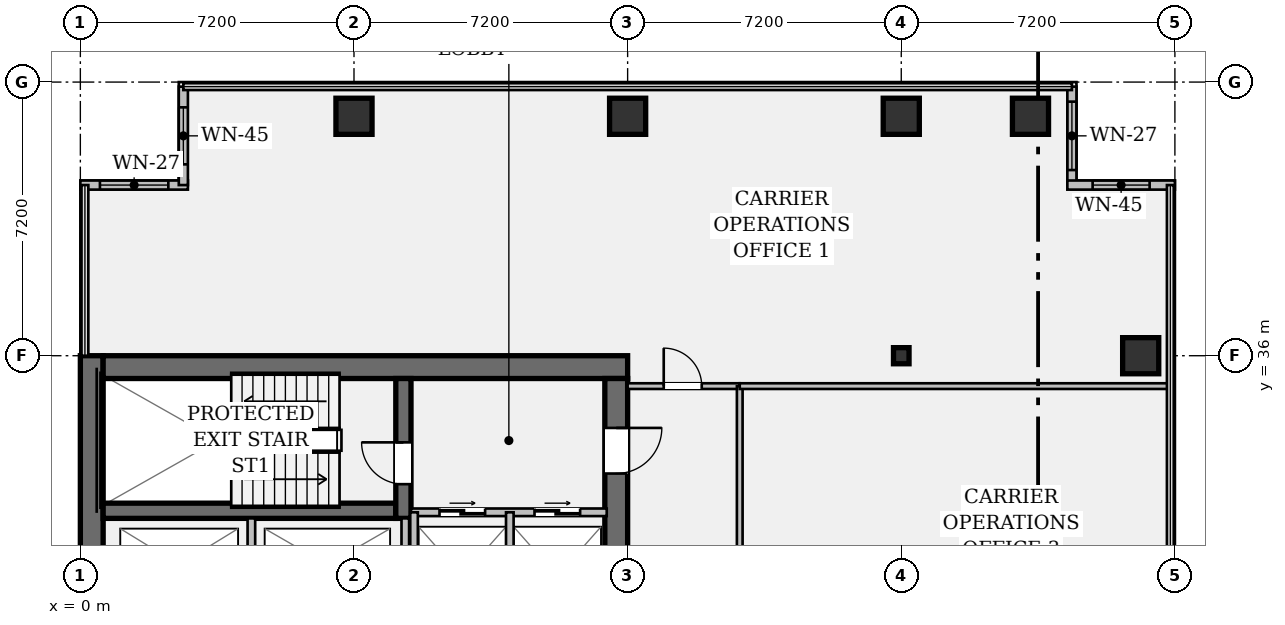
"""IFC4 building model, lengths in metres.
Left out: names, types, materials, properties, quantities, classifications, styles, units other than length and angle.
Written with IfcOpenShell. Run it as: python <this file> out.ifc"""

import sys

from ifc_helpers import new_model, si_unit, direction, frame, frame_2d, origin, origin_2d, place, context, subcontext, project, spatial, rectangle, hollow_rectangle, i_section, extrude, element, fill, save


model = new_model("IFC4")
c1 = context("Model", 3, precision=1e-05, world=origin(), true_north=direction((0.0, 1.0)))
c2 = subcontext(c1, "Body", "Model", "MODEL_VIEW")
j1 = project(units=[si_unit("LENGTHUNIT", "METRE"), si_unit("PLANEANGLEUNIT", "RADIAN")], contexts=[c1])
p1 = place(None, origin())
s1 = spatial("IfcSite", under=j1, at=p1, CompositionType="ELEMENT")
p2 = place(p1, origin())
s2 = spatial("IfcBuilding", under=s1, at=p2, CompositionType="ELEMENT")
p3 = place(p2, frame((0.0, 0.0, 88.9)))
s3 = spatial("IfcBuildingStorey", under=s2, at=p3, CompositionType="ELEMENT", Elevation=88.9)
p4 = place(p3, frame((0.3, 7.2, 0.0), z_axis=(0.0, 0.0, 1.0), x_axis=(0.0, 1.0, 0.0)))
e1 = element("IfcWall", 1, at=p4, inside=s3, PredefinedType="SHEAR", context=c2, shape_type="SweptSolid", body=[
    extrude(rectangle(XDim=28.8, YDim=0.6, at=frame_2d((14.4, 0.0))), origin(), (0.0, 0.0, 1.0), 3.57),
])
p5 = place(p3, frame((0.6, 35.7, 0.0), z_axis=(0.0, 0.0, 1.0), x_axis=(1.0, 0.0, 0.0)))
e2 = element("IfcWall", 2, at=p5, inside=s3, PredefinedType="SHEAR", context=c2, shape_type="SweptSolid", body=[
    extrude(rectangle(XDim=13.8, YDim=0.6, at=frame_2d((6.9, 0.0))), origin(), (0.0, 0.0, 1.0), 3.57),
])
p6 = place(p3, frame((14.1, 35.4, 0.0), z_axis=(0.0, 0.0, 1.0), x_axis=(0.0, -1.0, 0.0)))
e3 = element("IfcWall", 3, at=p6, inside=s3, PredefinedType="SHEAR", context=c2, shape_type="SweptSolid", body=[
    extrude(rectangle(XDim=27.6, YDim=0.6, at=frame_2d((13.8, 0.0))), origin(), (0.0, 0.0, 1.0), 3.57),
])
p7 = place(p6, frame((1.3, 0.0, 0.0)))
e4 = element("IfcOpeningElement", 4, at=p7, cuts=e3, PredefinedType="OPENING", context=c2, shape_type="SweptSolid", body=[
    extrude(rectangle(XDim=1.2, YDim=2.15, at=frame_2d((0.6, 1.075))), frame((0.0, 0.312, 0.0), z_axis=(0.0, -1.0, 0.0), x_axis=(1.0, 0.0, 0.0)), (0.0, 0.0, 1.0), 0.624),
])
p8 = place(p6, frame((25.25, 0.0, 0.0)))
e5 = element("IfcOpeningElement", 5, at=p8, cuts=e3, PredefinedType="OPENING", context=c2, shape_type="SweptSolid", body=[
    extrude(rectangle(XDim=1.2, YDim=2.15, at=frame_2d((0.6, 1.075))), frame((0.0, 0.312, 0.0), z_axis=(0.0, -1.0, 0.0), x_axis=(1.0, 0.0, 0.0)), (0.0, 0.0, 1.0), 0.624),
])
p9 = place(p6, frame((14.6, 0.0, 0.0)))
e6 = element("IfcOpeningElement", 6, at=p9, cuts=e3, PredefinedType="OPENING", context=c2, shape_type="SweptSolid", body=[
    extrude(rectangle(XDim=1.6, YDim=2.2, at=frame_2d((0.8, 1.1))), frame((0.0, 0.312, 0.0), z_axis=(0.0, -1.0, 0.0), x_axis=(1.0, 0.0, 0.0)), (0.0, 0.0, 1.0), 0.624),
])
p10 = place(p3, frame((0.6, 31.92, 0.0), z_axis=(0.0, 0.0, 1.0), x_axis=(1.0, 0.0, 0.0)))
e7 = element("IfcWall", 7, at=p10, inside=s3, PredefinedType="SHEAR", context=c2, shape_type="SweptSolid", body=[
    extrude(rectangle(XDim=7.7, YDim=0.4, at=frame_2d((3.85, 0.0))), origin(), (0.0, 0.0, 1.0), 3.57),
])
p11 = place(p3, frame((8.5, 31.72, 0.0), z_axis=(0.0, 0.0, 1.0), x_axis=(0.0, 1.0, 0.0)))
e8 = element("IfcWall", 8, at=p11, inside=s3, PredefinedType="SHEAR", context=c2, shape_type="SweptSolid", body=[
    extrude(rectangle(XDim=3.68, YDim=0.4, at=frame_2d((1.84, 0.0))), origin(), (0.0, 0.0, 1.0), 3.57),
])
p12 = place(p11, frame((0.9, 0.0, 0.0)))
e9 = element("IfcOpeningElement", 9, at=p12, cuts=e8, PredefinedType="OPENING", context=c2, shape_type="SweptSolid", body=[
    extrude(rectangle(XDim=1.1, YDim=2.15, at=frame_2d((0.55, 1.075))), frame((0.0, 0.212, 0.0), z_axis=(0.0, -1.0, 0.0), x_axis=(1.0, 0.0, 0.0)), (0.0, 0.0, 1.0), 0.424),
])
for number, where, z_axis, x_axis in (
    (10, (7.2, 42.3, 0.0), (0.0, 0.0, 1.0), (1.0, 0.0, 0.0)),
    (11, (14.4, 42.3, 0.0), (0.0, 0.0, 1.0), (1.0, 0.0, 0.0)),
):
    element("IfcColumn", number, at=place(p3, frame(where, z_axis=z_axis, x_axis=x_axis)), inside=s3, PredefinedType="COLUMN", context=c2, shape_type="SweptSolid", body=[
        extrude(hollow_rectangle(XDim=0.95, YDim=0.95, WallThickness=0.06, at=origin_2d()), origin(), (0.0, 0.0, 1.0), 3.57),
    ])
p13 = place(p3, frame((21.6, 36.0, 0.0), z_axis=(0.0, 0.0, 1.0), x_axis=(1.0, 0.0, 0.0)))
e12 = element("IfcColumn", 12, at=p13, inside=s3, PredefinedType="COLUMN", context=c2, shape_type="SweptSolid", body=[
    extrude(i_section(OverallWidth=0.409, OverallDepth=0.424, WebThickness=0.033, FlangeThickness=0.052, FilletRadius=0.018, at=origin_2d()), origin(), (0.0, 0.0, 1.0), 3.57),
])
p14 = place(p3, frame((21.6, 42.3, 0.0), z_axis=(0.0, 0.0, 1.0), x_axis=(1.0, 0.0, 0.0)))
e13 = element("IfcColumn", 13, at=p14, inside=s3, PredefinedType="COLUMN", context=c2, shape_type="SweptSolid", body=[
    extrude(hollow_rectangle(XDim=0.95, YDim=0.95, WallThickness=0.06, at=origin_2d()), origin(), (0.0, 0.0, 1.0), 3.57),
])
for number, where, z_axis, x_axis in (
    (14, (25.0, 42.3, 0.0), (0.0, 0.0, 1.0), (1.0, 0.0, 0.0)),
    (15, (27.9, 36.0, 0.0), (0.0, 0.0, 1.0), (1.0, 0.0, 0.0)),
):
    element("IfcColumn", number, at=place(p3, frame(where, z_axis=z_axis, x_axis=x_axis)), inside=s3, PredefinedType="COLUMN", context=c2, shape_type="SweptSolid", body=[
        extrude(hollow_rectangle(XDim=0.95, YDim=0.95, WallThickness=0.06, at=origin_2d()), origin(), (0.0, 0.0, 1.0), 3.85),
    ])
p15 = place(p3, frame((0.0, 40.49, 0.0), z_axis=(0.0, 0.0, 1.0), x_axis=(1.0, 0.0, 0.0)))
e16 = element("IfcWall", 16, at=p15, inside=s3, PredefinedType="STANDARD", context=c2, shape_type="SweptSolid", body=[
    extrude(rectangle(XDim=2.83, YDim=0.24, at=frame_2d((1.415, 0.0))), origin(), (0.0, 0.0, 1.0), 3.57),
])
p16 = place(p15, frame((0.515, 0.0, 0.95)))
e17 = element("IfcOpeningElement", 17, at=p16, cuts=e16, PredefinedType="OPENING", context=c2, shape_type="SweptSolid", body=[
    extrude(rectangle(XDim=1.8, YDim=1.35, at=frame_2d((0.9, 0.675))), frame((0.0, 0.132, 0.0), z_axis=(0.0, -1.0, 0.0), x_axis=(1.0, 0.0, 0.0)), (0.0, 0.0, 1.0), 0.264),
])
p17 = place(p3, frame((2.71, 40.49, 0.0), z_axis=(0.0, 0.0, 1.0), x_axis=(0.0, 1.0, 0.0)))
e18 = element("IfcWall", 18, at=p17, inside=s3, PredefinedType="STANDARD", context=c2, shape_type="SweptSolid", body=[
    extrude(rectangle(XDim=2.59, YDim=0.24, at=frame_2d((1.295, 0.0))), origin(), (0.0, 0.0, 1.0), 3.57),
])
p18 = place(p17, frame((0.545, 0.0, 0.95)))
e19 = element("IfcOpeningElement", 19, at=p18, cuts=e18, PredefinedType="OPENING", context=c2, shape_type="SweptSolid", body=[
    extrude(rectangle(XDim=1.5, YDim=1.8, at=frame_2d((0.75, 0.9))), frame((0.0, 0.132, 0.0), z_axis=(0.0, -1.0, 0.0), x_axis=(1.0, 0.0, 0.0)), (0.0, 0.0, 1.0), 0.264),
])
p19 = place(p3, frame((26.09, 43.08, 0.0), z_axis=(0.0, 0.0, 1.0), x_axis=(0.0, -1.0, 0.0)))
e20 = element("IfcWall", 20, at=p19, inside=s3, PredefinedType="STANDARD", context=c2, shape_type="SweptSolid", body=[
    extrude(rectangle(XDim=2.59, YDim=0.24, at=frame_2d((1.295, 0.0))), origin(), (0.0, 0.0, 1.0), 3.57),
])
p20 = place(p19, frame((0.395, 0.0, 0.95)))
e21 = element("IfcOpeningElement", 21, at=p20, cuts=e20, PredefinedType="OPENING", context=c2, shape_type="SweptSolid", body=[
    extrude(rectangle(XDim=1.8, YDim=1.35, at=frame_2d((0.9, 0.675))), frame((0.0, 0.132, 0.0), z_axis=(0.0, -1.0, 0.0), x_axis=(1.0, 0.0, 0.0)), (0.0, 0.0, 1.0), 0.264),
])
p21 = place(p3, frame((25.97, 40.49, 0.0), z_axis=(0.0, 0.0, 1.0), x_axis=(1.0, 0.0, 0.0)))
e22 = element("IfcWall", 22, at=p21, inside=s3, PredefinedType="STANDARD", context=c2, shape_type="SweptSolid", body=[
    extrude(rectangle(XDim=2.83, YDim=0.24, at=frame_2d((1.415, 0.0))), origin(), (0.0, 0.0, 1.0), 3.57),
])
p22 = place(p21, frame((0.665, 0.0, 0.95)))
e23 = element("IfcOpeningElement", 23, at=p22, cuts=e22, PredefinedType="OPENING", context=c2, shape_type="SweptSolid", body=[
    extrude(rectangle(XDim=1.5, YDim=1.8, at=frame_2d((0.75, 0.9))), frame((0.0, 0.132, 0.0), z_axis=(0.0, -1.0, 0.0), x_axis=(1.0, 0.0, 0.0)), (0.0, 0.0, 1.0), 0.264),
])
p23 = place(p3, frame((8.7, 31.88, 0.0), z_axis=(0.0, 0.0, 1.0), x_axis=(1.0, 0.0, 0.0)))
e24 = element("IfcWall", 24, at=p23, inside=s3, PredefinedType="PARTITIONING", context=c2, shape_type="SweptSolid", body=[
    extrude(rectangle(XDim=5.15, YDim=0.2, at=frame_2d((2.575, 0.0))), origin(), (0.0, 0.0, 1.0), 3.57),
])
p24 = place(p23, frame((0.75, 0.0, 0.0)))
e25 = element("IfcOpeningElement", 25, at=p24, cuts=e24, PredefinedType="OPENING", context=c2, shape_type="SweptSolid", body=[
    extrude(rectangle(XDim=1.2, YDim=2.2, at=frame_2d((0.6, 1.1))), frame((0.0, 0.112, 0.0), z_axis=(0.0, -1.0, 0.0), x_axis=(1.0, 0.0, 0.0)), (0.0, 0.0, 1.0), 0.224),
])
p25 = place(p23, frame((3.25, 0.0, 0.0)))
e26 = element("IfcOpeningElement", 26, at=p25, cuts=e24, PredefinedType="OPENING", context=c2, shape_type="SweptSolid", body=[
    extrude(rectangle(XDim=1.2, YDim=2.2, at=frame_2d((0.6, 1.1))), frame((0.0, 0.112, 0.0), z_axis=(0.0, -1.0, 0.0), x_axis=(1.0, 0.0, 0.0)), (0.0, 0.0, 1.0), 0.224),
])
for number, where, z_axis, x_axis in (
    (27, (8.78, 28.78, 0.0), (0.0, 0.0, 1.0), (0.0, 1.0, 0.0)),
    (28, (11.3, 28.78, 0.0), (0.0, 0.0, 1.0), (0.0, 1.0, 0.0)),
):
    element("IfcWall", number, at=place(p3, frame(where, z_axis=z_axis, x_axis=x_axis)), inside=s3, PredefinedType="PARTITIONING", context=c2, shape_type="SweptSolid", body=[
        extrude(rectangle(XDim=3.1, YDim=0.2, at=frame_2d((1.55, 0.0))), origin(), (0.0, 0.0, 1.0), 3.57),
    ])
for number, where, z_axis, x_axis in (
    (29, (4.5, 28.78, 0.0), (0.0, 0.0, 1.0), (0.0, 1.0, 0.0)),
    (30, (8.55, 28.78, 0.0), (0.0, 0.0, 1.0), (0.0, 1.0, 0.0)),
):
    element("IfcWall", number, at=place(p3, frame(where, z_axis=z_axis, x_axis=x_axis)), inside=s3, PredefinedType="PARTITIONING", context=c2, shape_type="SweptSolid", body=[
        extrude(rectangle(XDim=2.94, YDim=0.2, at=frame_2d((1.47, 0.0))), origin(), (0.0, 0.0, 1.0), 3.57),
    ])
p26 = place(p3, frame((14.4, 35.2, 0.0), z_axis=(0.0, 0.0, 1.0), x_axis=(1.0, 0.0, 0.0)))
e31 = element("IfcWall", 31, at=p26, inside=s3, PredefinedType="PARTITIONING", context=c2, shape_type="SweptSolid", body=[
    extrude(rectangle(XDim=2.95, YDim=0.15, at=frame_2d((1.475, 0.0))), origin(), (0.0, 0.0, 1.0), 3.088),
])
p27 = place(p26, frame((0.95, 0.0, 0.0)))
e32 = element("IfcOpeningElement", 32, at=p27, cuts=e31, PredefinedType="OPENING", context=c2, shape_type="SweptSolid", body=[
    extrude(rectangle(XDim=1.0, YDim=2.15, at=frame_2d((0.5, 1.075))), frame((0.0, 0.087, 0.0), z_axis=(0.0, -1.0, 0.0), x_axis=(1.0, 0.0, 0.0)), (0.0, 0.0, 1.0), 0.174),
])
p28 = place(p3, frame((17.35, 12.4, 0.0), z_axis=(0.0, 0.0, 1.0), x_axis=(0.0, 1.0, 0.0)))
e33 = element("IfcWall", 33, at=p28, inside=s3, PredefinedType="PARTITIONING", context=c2, shape_type="SweptSolid", body=[
    extrude(rectangle(XDim=22.8, YDim=0.15, at=frame_2d((11.4, 0.0))), origin(), (0.0, 0.0, 1.0), 2.783),
])
p29 = place(p28, frame((4.3, 0.0, 0.0)))
e34 = element("IfcOpeningElement", 34, at=p29, cuts=e33, PredefinedType="OPENING", context=c2, shape_type="SweptSolid", body=[
    extrude(rectangle(XDim=0.95, YDim=2.15, at=frame_2d((0.475, 1.075))), frame((0.0, 0.087, 0.0), z_axis=(0.0, -1.0, 0.0), x_axis=(1.0, 0.0, 0.0)), (0.0, 0.0, 1.0), 0.174),
])
p30 = place(p28, frame((8.0, 0.0, 0.0)))
e35 = element("IfcOpeningElement", 35, at=p30, cuts=e33, PredefinedType="OPENING", context=c2, shape_type="SweptSolid", body=[
    extrude(rectangle(XDim=0.95, YDim=2.15, at=frame_2d((0.475, 1.075))), frame((0.0, 0.087, 0.0), z_axis=(0.0, -1.0, 0.0), x_axis=(1.0, 0.0, 0.0)), (0.0, 0.0, 1.0), 0.174),
])
p31 = place(p28, frame((16.2, 0.0, 0.0)))
e36 = element("IfcOpeningElement", 36, at=p31, cuts=e33, PredefinedType="OPENING", context=c2, shape_type="SweptSolid", body=[
    extrude(rectangle(XDim=0.95, YDim=2.15, at=frame_2d((0.475, 1.075))), frame((0.0, 0.087, 0.0), z_axis=(0.0, -1.0, 0.0), x_axis=(1.0, 0.0, 0.0)), (0.0, 0.0, 1.0), 0.174),
])
p32 = place(p3, frame((17.35, 35.2, 0.0), z_axis=(0.0, 0.0, 1.0), x_axis=(1.0, 0.0, 0.0)))
e37 = element("IfcWall", 37, at=p32, inside=s3, PredefinedType="PARTITIONING", context=c2, shape_type="SweptSolid", body=[
    extrude(rectangle(XDim=11.33, YDim=0.15, at=frame_2d((5.665, 0.0))), origin(), (0.0, 0.0, 1.0), 2.783),
])
p33 = place(p16, origin())
e38 = element("IfcWindow", 38, at=p33, inside=s3, PartitioningType="SINGLE_PANEL", PredefinedType="WINDOW", context=c2, shape_type="SweptSolid", body=[
    extrude(rectangle(XDim=1.8, YDim=1.35, at=frame_2d((0.9, 0.675))), frame((0.0, 0.03, 0.0), z_axis=(0.0, -1.0, 0.0), x_axis=(1.0, 0.0, 0.0)), (0.0, 0.0, 1.0), 0.06),
])
fill(e17, e38)
p34 = place(p18, origin())
e39 = element("IfcWindow", 39, at=p34, inside=s3, PartitioningType="SINGLE_PANEL", PredefinedType="WINDOW", context=c2, shape_type="SweptSolid", body=[
    extrude(rectangle(XDim=1.5, YDim=1.8, at=frame_2d((0.75, 0.9))), frame((0.0, 0.03, 0.0), z_axis=(0.0, -1.0, 0.0), x_axis=(1.0, 0.0, 0.0)), (0.0, 0.0, 1.0), 0.06),
])
fill(e19, e39)
p35 = place(p20, origin())
e40 = element("IfcWindow", 40, at=p35, inside=s3, PartitioningType="SINGLE_PANEL", PredefinedType="WINDOW", context=c2, shape_type="SweptSolid", body=[
    extrude(rectangle(XDim=1.8, YDim=1.35, at=frame_2d((0.9, 0.675))), frame((0.0, 0.03, 0.0), z_axis=(0.0, -1.0, 0.0), x_axis=(1.0, 0.0, 0.0)), (0.0, 0.0, 1.0), 0.06),
])
fill(e21, e40)
p36 = place(p22, origin())
e41 = element("IfcWindow", 41, at=p36, inside=s3, PartitioningType="SINGLE_PANEL", PredefinedType="WINDOW", context=c2, shape_type="SweptSolid", body=[
    extrude(rectangle(XDim=1.5, YDim=1.8, at=frame_2d((0.75, 0.9))), frame((0.0, 0.03, 0.0), z_axis=(0.0, -1.0, 0.0), x_axis=(1.0, 0.0, 0.0)), (0.0, 0.0, 1.0), 0.06),
])
fill(e23, e41)
p37 = place(p12, origin())
e42 = element("IfcDoor", 42, at=p37, inside=s3, OperationType="SINGLE_SWING_RIGHT", PredefinedType="DOOR", context=c2, shape_type="SweptSolid", body=[
    extrude(rectangle(XDim=1.1, YDim=2.15, at=frame_2d((0.55, 1.075))), frame((0.0, 0.025, 0.0), z_axis=(0.0, -1.0, 0.0), x_axis=(1.0, 0.0, 0.0)), (0.0, 0.0, 1.0), 0.05),
])
fill(e9, e42)
p38 = place(p7, origin())
e43 = element("IfcDoor", 43, at=p38, inside=s3, OperationType="SINGLE_SWING_LEFT", PredefinedType="DOOR", context=c2, shape_type="SweptSolid", body=[
    extrude(rectangle(XDim=1.2, YDim=2.15, at=frame_2d((0.6, 1.075))), frame((0.0, 0.025, 0.0), z_axis=(0.0, -1.0, 0.0), x_axis=(1.0, 0.0, 0.0)), (0.0, 0.0, 1.0), 0.05),
])
fill(e4, e43)
p39 = place(p24, origin())
e44 = element("IfcDoor", 44, at=p39, inside=s3, OperationType="DOUBLE_DOOR_SLIDING", PredefinedType="DOOR", context=c2, shape_type="SweptSolid", body=[
    extrude(rectangle(XDim=1.2, YDim=2.2, at=frame_2d((0.6, 1.1))), frame((0.0, 0.025, 0.0), z_axis=(0.0, -1.0, 0.0), x_axis=(1.0, 0.0, 0.0)), (0.0, 0.0, 1.0), 0.05),
])
fill(e25, e44)
p40 = place(p25, origin())
e45 = element("IfcDoor", 45, at=p40, inside=s3, OperationType="DOUBLE_DOOR_SLIDING", PredefinedType="DOOR", context=c2, shape_type="SweptSolid", body=[
    extrude(rectangle(XDim=1.2, YDim=2.2, at=frame_2d((0.6, 1.1))), frame((0.0, 0.025, 0.0), z_axis=(0.0, -1.0, 0.0), x_axis=(1.0, 0.0, 0.0)), (0.0, 0.0, 1.0), 0.05),
])
fill(e26, e45)
p41 = place(p27, origin())
e46 = element("IfcDoor", 46, at=p41, inside=s3, OperationType="SINGLE_SWING_LEFT", PredefinedType="DOOR", context=c2, shape_type="SweptSolid", body=[
    extrude(rectangle(XDim=1.0, YDim=2.15, at=frame_2d((0.5, 1.075))), frame((0.0, 0.025, 0.0), z_axis=(0.0, -1.0, 0.0), x_axis=(1.0, 0.0, 0.0)), (0.0, 0.0, 1.0), 0.05),
])
fill(e32, e46)
save(model, sys.argv[1])
